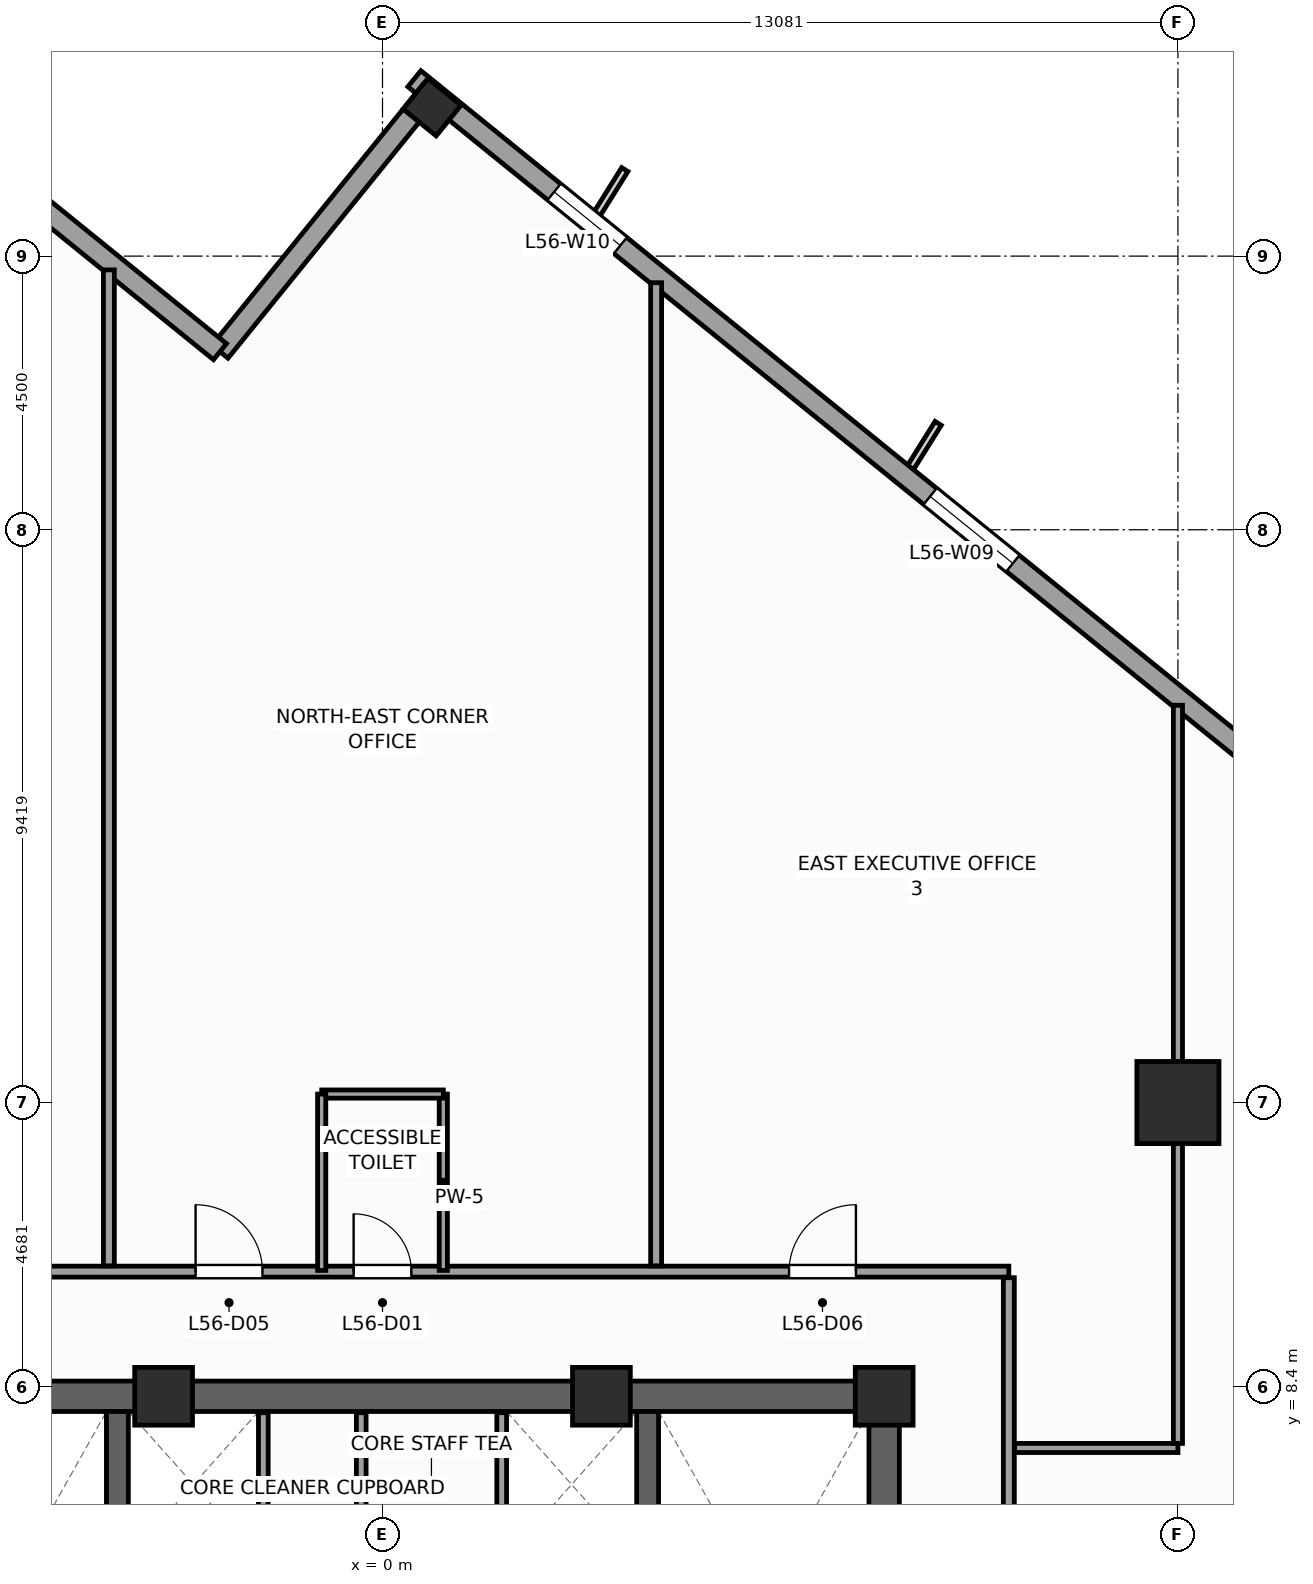
"""IFC4 building model, lengths in metres.
Left out: names, types, materials, properties, quantities, classifications, styles, units other than length and angle.
Written with IfcOpenShell. Run it as: python <this file> out.ifc"""

import sys

from ifc_helpers import new_model, si_unit, direction, frame, frame_2d, origin, origin_2d, place, context, subcontext, project, spatial, rectangle, extrude, source, transform, mapped, element, fill, save


model = new_model("IFC4")
c1 = context("Model", 3, precision=1e-05, world=origin(), true_north=direction((0.0, 1.0)))
c2 = subcontext(c1, "Body", "Model", "MODEL_VIEW")
j1 = project(units=[si_unit("LENGTHUNIT", "METRE"), si_unit("PLANEANGLEUNIT", "RADIAN")], contexts=[c1])
p1 = place(None, origin())
s1 = spatial("IfcSite", under=j1, at=p1, CompositionType="ELEMENT")
p2 = place(p1, origin())
s2 = spatial("IfcBuilding", under=s1, at=p2, CompositionType="ELEMENT")
p3 = place(p2, frame((0.0, 0.0, 232.9)))
s3 = spatial("IfcBuildingStorey", under=s2, at=p3, CompositionType="ELEMENT", Elevation=232.9)
p4 = place(p3, frame((-8.5, 8.25, 0.0), z_axis=(0.0, 0.0, 1.0), x_axis=(1.0, 0.0, 0.0)))
e1 = element("IfcWall", 1, at=p4, inside=s3, PredefinedType="SHEAR", context=c2, shape_type="SweptSolid", body=[
    extrude(rectangle(XDim=17.0, YDim=0.5, at=frame_2d((8.5, 0.0))), origin(), (0.0, 0.0, 1.0), 3.9),
])
p5 = place(p3, frame((8.25, -8.0, 0.0), z_axis=(0.0, 0.0, 1.0), x_axis=(0.0, 1.0, 0.0)))
e2 = element("IfcWall", 2, at=p5, inside=s3, PredefinedType="SHEAR", context=c2, shape_type="SweptSolid", body=[
    extrude(rectangle(XDim=16.0, YDim=0.5, at=frame_2d((8.0, 0.0))), origin(), (0.0, 0.0, 1.0), 3.9),
])
p6 = place(p5, frame((4.69, 0.0, 0.0)))
e3 = element("IfcOpeningElement", 3, at=p6, cuts=e2, PredefinedType="OPENING", context=c2, shape_type="SweptSolid", body=[
    extrude(rectangle(XDim=1.3, YDim=2.2, at=frame_2d((0.65, 1.1))), frame((0.0, 0.26, 0.0), z_axis=(0.0, -1.0, 0.0), x_axis=(1.0, 0.0, 0.0)), (0.0, 0.0, 1.0), 0.52),
])
for number, where, z_axis, x_axis in (
    (4, (-4.36, -8.0, 0.0), (0.0, 0.0, 1.0), (0.0, 1.0, 0.0)),
    (5, (4.36, -8.0, 0.0), (0.0, 0.0, 1.0), (0.0, 1.0, 0.0)),
):
    element("IfcWall", number, at=place(p3, frame(where, z_axis=z_axis, x_axis=x_axis)), inside=s3, PredefinedType="SHEAR", context=c2, shape_type="SweptSolid", body=[
        extrude(rectangle(XDim=16.0, YDim=0.36, at=frame_2d((8.0, 0.0))), origin(), (0.0, 0.0, 1.0), 3.9),
    ])
m1 = source(origin(), c2, "Body", "SweptSolid", [
    extrude(rectangle(XDim=0.95, YDim=0.95, at=origin_2d()), origin(), (0.0, 0.0, 1.0), 3.9),
])
for number, where, z_axis, x_axis in (
    (6, (8.25, 8.25, 0.0), (0.0, 0.0, 1.0), (1.0, 0.0, 0.0)),
    (7, (-3.6, 8.25, 0.0), (0.0, 0.0, 1.0), (1.0, 0.0, 0.0)),
    (8, (3.6, 8.25, 0.0), (0.0, 0.0, 1.0), (1.0, 0.0, 0.0)),
):
    element("IfcColumn", number, at=place(p3, frame(where, z_axis=z_axis, x_axis=x_axis)), inside=s3, PredefinedType="PILASTER", context=c2, shape_type="MappedRepresentation", body=[
        mapped(m1, transform((0.0, 0.0, 0.0), scale=1.0)),
    ])
m2 = source(origin(), c2, "Body", "SweptSolid", [
    extrude(rectangle(XDim=1.35, YDim=1.35, at=origin_2d()), origin(), (0.0, 0.0, 1.0), 3.9),
])
p7 = place(p3, frame((13.081, 13.081, 0.0), z_axis=(0.0, 0.0, 1.0), x_axis=(1.0, 0.0, 0.0)))
e9 = element("IfcColumn", 9, at=p7, inside=s3, PredefinedType="COLUMN", context=c2, shape_type="MappedRepresentation", body=[
    mapped(m2, transform((0.0, 0.0, 0.0), scale=1.0)),
])
m3 = source(origin(), c2, "Body", "SweptSolid", [
    extrude(rectangle(XDim=0.65, YDim=0.7, at=origin_2d()), origin(), (0.0, 0.0, 1.0), 3.9),
])
p8 = place(p3, frame((0.815, 29.45, 0.0), z_axis=(0.0, 0.0, 1.0), x_axis=(0.62932039105, 0.777145961457, 0.0)))
e10 = element("IfcColumn", 10, at=p8, inside=s3, PredefinedType="COLUMN", context=c2, shape_type="MappedRepresentation", body=[
    mapped(m3, transform((0.0, 0.0, 0.0), scale=1.0)),
])
p9 = place(p3, frame((29.154, 6.733, 0.0), z_axis=(0.0, 0.0, 1.0), x_axis=(-0.77714192302, 0.629325378072, 0.0)))
e11 = element("IfcWall", 11, at=p9, inside=s3, PredefinedType="STANDARD", context=c2, shape_type="SweptSolid", body=[
    extrude(rectangle(XDim=36.84, YDim=0.34, at=frame_2d((18.42, 0.0))), origin(), (0.0, 0.0, 1.0), 2.96),
])
p10 = place(p9, frame((3.721, 0.0, 0.48)))
e12 = element("IfcOpeningElement", 12, at=p10, cuts=e11, PredefinedType="OPENING", context=c2, shape_type="SweptSolid", body=[
    extrude(rectangle(XDim=1.4, YDim=2.4, at=frame_2d((0.7, 1.2))), frame((0.0, 0.18, 0.0), z_axis=(0.0, -1.0, 0.0), x_axis=(1.0, 0.0, 0.0)), (0.0, 0.0, 1.0), 0.36),
])
p11 = place(p9, frame((9.809, 0.0, 0.58)))
e13 = element("IfcOpeningElement", 13, at=p11, cuts=e11, PredefinedType="OPENING", context=c2, shape_type="SweptSolid", body=[
    extrude(rectangle(XDim=1.75, YDim=2.3, at=frame_2d((0.875, 1.15))), frame((0.0, 0.18, 0.0), z_axis=(0.0, -1.0, 0.0), x_axis=(1.0, 0.0, 0.0)), (0.0, 0.0, 1.0), 0.36),
])
p12 = place(p9, frame((16.058, 0.0, 0.58)))
e14 = element("IfcOpeningElement", 14, at=p12, cuts=e11, PredefinedType="OPENING", context=c2, shape_type="SweptSolid", body=[
    extrude(rectangle(XDim=1.75, YDim=2.3, at=frame_2d((0.875, 1.15))), frame((0.0, 0.18, 0.0), z_axis=(0.0, -1.0, 0.0), x_axis=(1.0, 0.0, 0.0)), (0.0, 0.0, 1.0), 0.36),
])
p13 = place(p9, frame((24.176, 0.0, 0.58)))
e15 = element("IfcOpeningElement", 15, at=p13, cuts=e11, PredefinedType="OPENING", context=c2, shape_type="SweptSolid", body=[
    extrude(rectangle(XDim=1.75, YDim=2.3, at=frame_2d((0.875, 1.15))), frame((0.0, 0.18, 0.0), z_axis=(0.0, -1.0, 0.0), x_axis=(1.0, 0.0, 0.0)), (0.0, 0.0, 1.0), 0.36),
])
p14 = place(p9, frame((32.482, 0.0, 0.48)))
e16 = element("IfcOpeningElement", 16, at=p14, cuts=e11, PredefinedType="OPENING", context=c2, shape_type="SweptSolid", body=[
    extrude(rectangle(XDim=1.4, YDim=2.4, at=frame_2d((0.7, 1.2))), frame((0.0, 0.18, 0.0), z_axis=(0.0, -1.0, 0.0), x_axis=(1.0, 0.0, 0.0)), (0.0, 0.0, 1.0), 0.36),
])
p15 = place(p3, frame((0.789, 29.703, 0.0), z_axis=(0.0, 0.0, 1.0), x_axis=(-0.629323365087, -0.77714355312, 0.0)))
e17 = element("IfcWall", 17, at=p15, inside=s3, PredefinedType="STANDARD", context=c2, shape_type="SweptSolid", body=[
    extrude(rectangle(XDim=5.5, YDim=0.34, at=frame_2d((2.75, 0.0))), origin(), (0.0, 0.0, 1.0), 3.66),
])
p16 = place(p3, frame((-2.673, 25.429, 0.0), z_axis=(0.0, 0.0, 1.0), x_axis=(-0.777162640055, 0.629299794138, 0.0)))
e18 = element("IfcWall", 18, at=p16, inside=s3, PredefinedType="STANDARD", context=c2, shape_type="SweptSolid", body=[
    extrude(rectangle(XDim=5.67, YDim=0.34, at=frame_2d((2.835, 0.0))), origin(), (0.0, 0.0, 1.0), 3.66),
])
for number, where, z_axis, x_axis in (
    (19, (-1.96, 4.58, 0.0), (0.0, 0.0, 1.0), (0.0, 1.0, 0.0)),
    (20, (1.96, 4.58, 0.0), (0.0, 0.0, 1.0), (0.0, 1.0, 0.0)),
):
    element("IfcWall", number, at=place(p3, frame(where, z_axis=z_axis, x_axis=x_axis)), inside=s3, PredefinedType="PARTITIONING", context=c2, shape_type="SweptSolid", body=[
        extrude(rectangle(XDim=3.4, YDim=0.16, at=frame_2d((1.7, 0.0))), origin(), (0.0, 0.0, 1.0), 3.66),
    ])
p17 = place(p3, frame((-0.35, 4.6, 0.0), z_axis=(0.0, 0.0, 1.0), x_axis=(0.0, 1.0, 0.0)))
e21 = element("IfcWall", 21, at=p17, inside=s3, PredefinedType="PARTITIONING", context=c2, shape_type="SweptSolid", body=[
    extrude(rectangle(XDim=3.38, YDim=0.16, at=frame_2d((1.69, 0.0))), origin(), (0.0, 0.0, 1.0), 3.66),
])
p18 = place(p3, frame((-11.4, 10.3, 0.0), z_axis=(0.0, 0.0, 1.0), x_axis=(1.0, 0.0, 0.0)))
e22 = element("IfcWall", 22, at=p18, inside=s3, PredefinedType="PARTITIONING", context=c2, shape_type="SweptSolid", body=[
    extrude(rectangle(XDim=21.7, YDim=0.18, at=frame_2d((10.85, 0.0))), origin(), (0.0, 0.0, 1.0), 3.66),
])
p19 = place(p18, frame((10.925, 0.0, 0.0)))
e23 = element("IfcOpeningElement", 23, at=p19, cuts=e22, PredefinedType="OPENING", context=c2, shape_type="SweptSolid", body=[
    extrude(rectangle(XDim=0.95, YDim=2.1, at=frame_2d((0.475, 1.05))), frame((0.0, 0.1, 0.0), z_axis=(0.0, -1.0, 0.0), x_axis=(1.0, 0.0, 0.0)), (0.0, 0.0, 1.0), 0.2),
])
p20 = place(p18, frame((3.724, 0.0, 0.0)))
e24 = element("IfcOpeningElement", 24, at=p20, cuts=e22, PredefinedType="OPENING", context=c2, shape_type="SweptSolid", body=[
    extrude(rectangle(XDim=1.1, YDim=2.2, at=frame_2d((0.55, 1.1))), frame((0.0, 0.1, 0.0), z_axis=(0.0, -1.0, 0.0), x_axis=(1.0, 0.0, 0.0)), (0.0, 0.0, 1.0), 0.2),
])
p21 = place(p18, frame((8.326, 0.0, 0.0)))
e25 = element("IfcOpeningElement", 25, at=p21, cuts=e22, PredefinedType="OPENING", context=c2, shape_type="SweptSolid", body=[
    extrude(rectangle(XDim=1.1, YDim=2.2, at=frame_2d((0.55, 1.1))), frame((0.0, 0.1, 0.0), z_axis=(0.0, -1.0, 0.0), x_axis=(1.0, 0.0, 0.0)), (0.0, 0.0, 1.0), 0.2),
])
p22 = place(p18, frame((18.085, 0.0, 0.0)))
e26 = element("IfcOpeningElement", 26, at=p22, cuts=e22, PredefinedType="OPENING", context=c2, shape_type="SweptSolid", body=[
    extrude(rectangle(XDim=1.1, YDim=2.2, at=frame_2d((0.55, 1.1))), frame((0.0, 0.1, 0.0), z_axis=(0.0, -1.0, 0.0), x_axis=(1.0, 0.0, 0.0)), (0.0, 0.0, 1.0), 0.2),
])
p23 = place(p3, frame((10.3, -10.2, 0.0), z_axis=(0.0, 0.0, 1.0), x_axis=(0.0, 1.0, 0.0)))
e27 = element("IfcWall", 27, at=p23, inside=s3, PredefinedType="PARTITIONING", context=c2, shape_type="SweptSolid", body=[
    extrude(rectangle(XDim=20.4, YDim=0.18, at=frame_2d((10.2, 0.0))), origin(), (0.0, 0.0, 1.0), 3.66),
])
p24 = place(p23, frame((14.95, 0.0, 0.0)))
e28 = element("IfcOpeningElement", 28, at=p24, cuts=e27, PredefinedType="OPENING", context=c2, shape_type="SweptSolid", body=[
    extrude(rectangle(XDim=1.1, YDim=2.2, at=frame_2d((0.55, 1.1))), frame((0.0, 0.1, 0.0), z_axis=(0.0, -1.0, 0.0), x_axis=(1.0, 0.0, 0.0)), (0.0, 0.0, 1.0), 0.2),
])
p25 = place(p23, frame((9.65, 0.0, 0.0)))
e29 = element("IfcOpeningElement", 29, at=p25, cuts=e27, PredefinedType="OPENING", context=c2, shape_type="SweptSolid", body=[
    extrude(rectangle(XDim=1.1, YDim=2.2, at=frame_2d((0.55, 1.1))), frame((0.0, 0.1, 0.0), z_axis=(0.0, -1.0, 0.0), x_axis=(1.0, 0.0, 0.0)), (0.0, 0.0, 1.0), 0.2),
])
p26 = place(p23, frame((4.35, 0.0, 0.0)))
e30 = element("IfcOpeningElement", 30, at=p26, cuts=e27, PredefinedType="OPENING", context=c2, shape_type="SweptSolid", body=[
    extrude(rectangle(XDim=1.1, YDim=2.2, at=frame_2d((0.55, 1.1))), frame((0.0, 0.1, 0.0), z_axis=(0.0, -1.0, 0.0), x_axis=(1.0, 0.0, 0.0)), (0.0, 0.0, 1.0), 0.2),
])
p27 = place(p3, frame((-4.5, 10.395, 0.0), z_axis=(0.0, 0.0, 1.0), x_axis=(0.0, 1.0, 0.0)))
e31 = element("IfcWall", 31, at=p27, inside=s3, PredefinedType="PARTITIONING", context=c2, shape_type="SweptSolid", body=[
    extrude(rectangle(XDim=16.378, YDim=0.18, at=frame_2d((8.189, 0.0))), origin(), (0.0, 0.0, 1.0), 3.66),
])
p28 = place(p3, frame((4.5, 10.395, 0.0), z_axis=(0.0, 0.0, 1.0), x_axis=(0.0, 1.0, 0.0)))
e32 = element("IfcWall", 32, at=p28, inside=s3, PredefinedType="PARTITIONING", context=c2, shape_type="SweptSolid", body=[
    extrude(rectangle(XDim=16.168, YDim=0.18, at=frame_2d((8.084, 0.0))), origin(), (0.0, 0.0, 1.0), 3.66),
])
p29 = place(p3, frame((10.395, 7.4, 0.0), z_axis=(0.0, 0.0, 1.0), x_axis=(1.0, 0.0, 0.0)))
e33 = element("IfcWall", 33, at=p29, inside=s3, PredefinedType="PARTITIONING", context=c2, shape_type="SweptSolid", body=[
    extrude(rectangle(XDim=2.686, YDim=0.15, at=frame_2d((1.343, 0.0))), origin(), (0.0, 0.0, 1.0), 3.66),
])
p30 = place(p3, frame((13.081, 7.475, 0.0), z_axis=(0.0, 0.0, 1.0), x_axis=(0.0, 1.0, 0.0)))
e34 = element("IfcWall", 34, at=p30, inside=s3, PredefinedType="PARTITIONING", context=c2, shape_type="SweptSolid", body=[
    extrude(rectangle(XDim=12.139, YDim=0.15, at=frame_2d((6.069, 0.0))), origin(), (0.0, 0.0, 1.0), 2.76),
])
p31 = place(p3, frame((1.0, 10.32, 0.0), z_axis=(0.0, 0.0, 1.0), x_axis=(0.0, 1.0, 0.0)))
e35 = element("IfcWall", 35, at=p31, inside=s3, PredefinedType="PARTITIONING", context=c2, shape_type="SweptSolid", body=[
    extrude(rectangle(XDim=2.9, YDim=0.135, at=frame_2d((1.45, 0.0))), origin(), (0.0, 0.0, 1.0), 3.66),
])
p32 = place(p3, frame((-1.0, 13.22, 0.0), z_axis=(0.0, 0.0, 1.0), x_axis=(1.0, 0.0, 0.0)))
e36 = element("IfcWall", 36, at=p32, inside=s3, PredefinedType="PARTITIONING", context=c2, shape_type="SweptSolid", body=[
    extrude(rectangle(XDim=2.0, YDim=0.135, at=frame_2d((1.0, 0.0))), origin(), (0.0, 0.0, 1.0), 2.76),
])
p33 = place(p3, frame((-1.0, 10.32, 0.0), z_axis=(0.0, 0.0, 1.0), x_axis=(0.0, 1.0, 0.0)))
e37 = element("IfcWall", 37, at=p33, inside=s3, PredefinedType="PARTITIONING", context=c2, shape_type="SweptSolid", body=[
    extrude(rectangle(XDim=2.9, YDim=0.135, at=frame_2d((1.45, 0.0))), origin(), (0.0, 0.0, 1.0), 3.66),
])
m4 = source(origin(), c2, "Body", "SweptSolid", [
    extrude(rectangle(XDim=1.75, YDim=2.3, at=frame_2d((0.875, 1.15))), frame((0.0, 0.03, 0.0), z_axis=(0.0, -1.0, 0.0), x_axis=(1.0, 0.0, 0.0)), (0.0, 0.0, 1.0), 0.06),
])
p34 = place(p13, origin())
e38 = element("IfcWindow", 38, at=p34, inside=s3, PartitioningType="SINGLE_PANEL", PredefinedType="WINDOW", context=c2, shape_type="MappedRepresentation", body=[
    mapped(m4, transform((0.0, 0.0, 0.0), scale=1.0)),
])
fill(e15, e38)
m5 = source(origin(), c2, "Body", "SweptSolid", [
    extrude(rectangle(XDim=1.4, YDim=2.4, at=frame_2d((0.7, 1.2))), frame((0.0, 0.03, 0.0), z_axis=(0.0, -1.0, 0.0), x_axis=(1.0, 0.0, 0.0)), (0.0, 0.0, 1.0), 0.06),
])
p35 = place(p14, origin())
e39 = element("IfcWindow", 39, at=p35, inside=s3, PartitioningType="SINGLE_PANEL", PredefinedType="WINDOW", context=c2, shape_type="MappedRepresentation", body=[
    mapped(m5, transform((0.0, 0.0, 0.0), scale=1.0)),
])
fill(e16, e39)
m6 = source(origin(), c2, "Body", "SweptSolid", [
    extrude(rectangle(XDim=0.95, YDim=2.1, at=frame_2d((0.475, 1.05))), frame((0.0, 0.025, 0.0), z_axis=(0.0, -1.0, 0.0), x_axis=(1.0, 0.0, 0.0)), (0.0, 0.0, 1.0), 0.05),
])
p36 = place(p19, origin())
e40 = element("IfcDoor", 40, at=p36, inside=s3, OperationType="SINGLE_SWING_LEFT", PredefinedType="DOOR", context=c2, shape_type="MappedRepresentation", body=[
    mapped(m6, transform((0.0, 0.0, 0.0), scale=1.0)),
])
fill(e23, e40)
m7 = source(origin(), c2, "Body", "SweptSolid", [
    extrude(rectangle(XDim=1.1, YDim=2.2, at=frame_2d((0.55, 1.1))), frame((0.0, 0.025, 0.0), z_axis=(0.0, -1.0, 0.0), x_axis=(1.0, 0.0, 0.0)), (0.0, 0.0, 1.0), 0.05),
])
p37 = place(p21, origin())
e41 = element("IfcDoor", 41, at=p37, inside=s3, OperationType="SINGLE_SWING_LEFT", PredefinedType="DOOR", context=c2, shape_type="MappedRepresentation", body=[
    mapped(m7, transform((0.0, 0.0, 0.0), scale=1.0)),
])
fill(e25, e41)
p38 = place(p22, origin())
e42 = element("IfcDoor", 42, at=p38, inside=s3, OperationType="SINGLE_SWING_RIGHT", PredefinedType="DOOR", context=c2, shape_type="MappedRepresentation", body=[
    mapped(m7, transform((0.0, 0.0, 0.0), scale=1.0)),
])
fill(e26, e42)
save(model, sys.argv[1])
